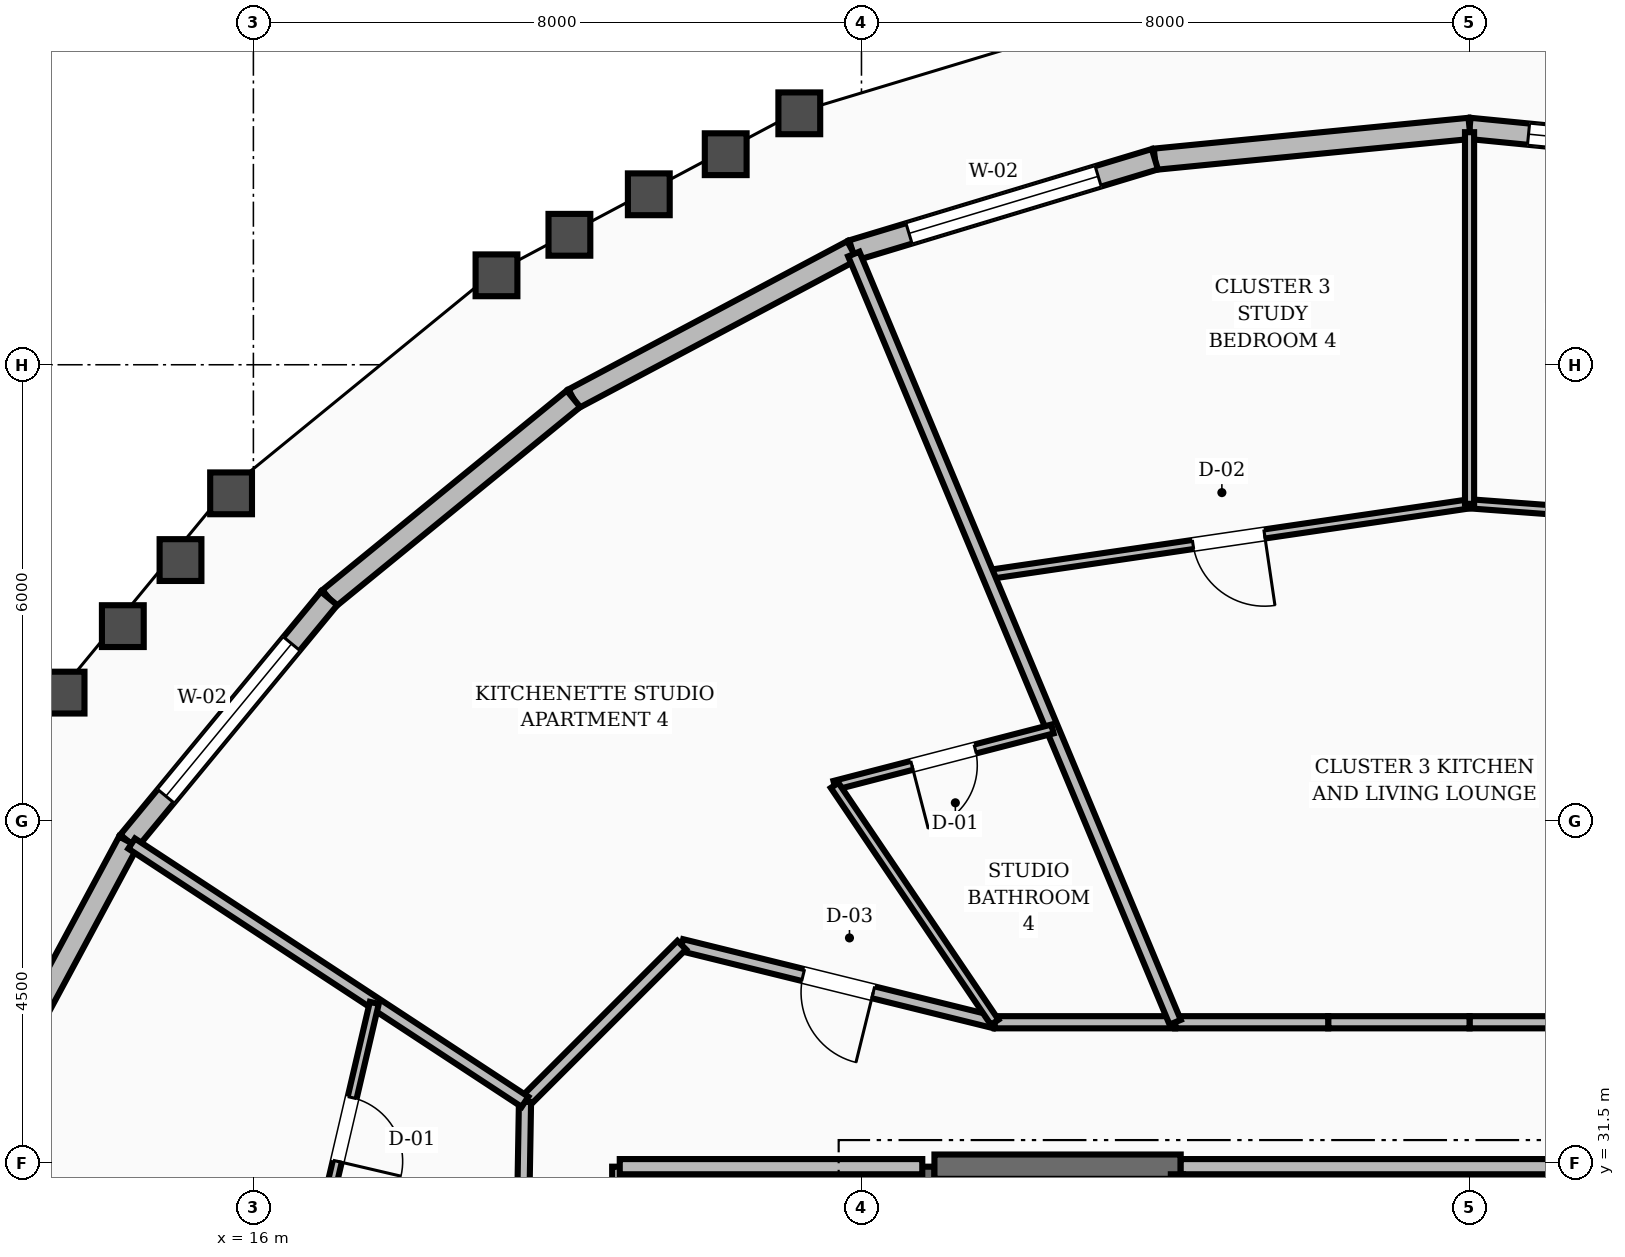
"""IFC4 building model, lengths in metres.
Left out: names, types, materials, properties, quantities, classifications, styles, units other than length and angle.
Written with IfcOpenShell. Run it as: python <this file> out.ifc"""

import sys

from ifc_helpers import new_model, si_unit, direction, frame, frame_2d, origin, place, context, subcontext, project, spatial, rectangle, extrude, element, fill, save


model = new_model("IFC4")
c1 = context("Model", 3, precision=1e-05, world=origin(), true_north=direction((0.0, 1.0)))
c2 = subcontext(c1, "Body", "Model", "MODEL_VIEW")
j1 = project(units=[si_unit("LENGTHUNIT", "METRE"), si_unit("PLANEANGLEUNIT", "RADIAN")], contexts=[c1])
p1 = place(None, origin())
s1 = spatial("IfcSite", under=j1, at=p1, CompositionType="ELEMENT")
p2 = place(p1, origin())
s2 = spatial("IfcBuilding", under=s1, at=p2, CompositionType="ELEMENT")
p3 = place(p2, frame((0.0, 0.0, 247.2)))
s3 = spatial("IfcBuildingStorey", under=s2, at=p3, CompositionType="ELEMENT", Elevation=247.2)
p4 = place(p3, frame((24.8, 25.15, 0.0), z_axis=(0.0, 0.0, 1.0), x_axis=(0.0, 1.0, 0.0)))
e1 = element("IfcWall", 1, at=p4, inside=s3, PredefinedType="SHEAR", context=c2, shape_type="SweptSolid", body=[
    extrude(rectangle(XDim=6.3, YDim=0.32, at=frame_2d((3.15, 0.0))), origin(), (0.0, 0.0, 1.0), 3.6),
])
p5 = place(p3, frame((24.96, 31.45, 0.0), z_axis=(0.0, 0.0, 1.0), x_axis=(1.0, 0.0, 0.0)))
e2 = element("IfcWall", 2, at=p5, inside=s3, PredefinedType="SHEAR", context=c2, shape_type="SweptSolid", body=[
    extrude(rectangle(XDim=3.24, YDim=0.32, at=frame_2d((1.62, 0.0))), origin(), (0.0, 0.0, 1.0), 3.6),
])
p6 = place(p3, frame((36.14, 44.704, 0.0), z_axis=(0.0, 0.0, 1.0), x_axis=(-0.995236791144, 0.09748707378, 0.0)))
e3 = element("IfcWall", 3, at=p6, inside=s3, PredefinedType="STANDARD", context=c2, shape_type="SweptSolid", body=[
    extrude(rectangle(XDim=4.16, YDim=0.28, at=frame_2d((2.08, 0.0))), origin(), (0.0, 0.0, 1.0), 2.88),
])
p7 = place(p6, frame((0.78, 0.0, 0.8)))
e4 = element("IfcOpeningElement", 4, at=p7, cuts=e3, PredefinedType="OPENING", context=c2, shape_type="SweptSolid", body=[
    extrude(rectangle(XDim=2.6, YDim=1.65, at=frame_2d((1.3, 0.825))), frame((0.0, 0.15, 0.0), z_axis=(0.0, -1.0, 0.0), x_axis=(1.0, 0.0, 0.0)), (0.0, 0.0, 1.0), 0.3),
])
p8 = place(p3, frame((32.0, 45.11, 0.0), z_axis=(0.0, 0.0, 1.0), x_axis=(-0.995236791144, -0.09748707378, 0.0)))
e5 = element("IfcWall", 5, at=p8, inside=s3, PredefinedType="STANDARD", context=c2, shape_type="SweptSolid", body=[
    extrude(rectangle(XDim=4.16, YDim=0.28, at=frame_2d((2.08, 0.0))), origin(), (0.0, 0.0, 1.0), 2.88),
])
p9 = place(p3, frame((27.86, 44.704, 0.0), z_axis=(0.0, 0.0, 1.0), x_axis=(-0.957348244256, -0.288936566083, 0.0)))
e6 = element("IfcWall", 6, at=p9, inside=s3, PredefinedType="STANDARD", context=c2, shape_type="SweptSolid", body=[
    extrude(rectangle(XDim=4.158, YDim=0.28, at=frame_2d((2.079, 0.0))), origin(), (0.0, 0.0, 1.0), 2.88),
])
p10 = place(p9, frame((0.779, 0.0, 0.8)))
e7 = element("IfcOpeningElement", 7, at=p10, cuts=e6, PredefinedType="OPENING", context=c2, shape_type="SweptSolid", body=[
    extrude(rectangle(XDim=2.6, YDim=1.65, at=frame_2d((1.3, 0.825))), frame((0.0, 0.15, 0.0), z_axis=(0.0, -1.0, 0.0), x_axis=(1.0, 0.0, 0.0)), (0.0, 0.0, 1.0), 0.3),
])
p11 = place(p3, frame((23.879, 43.503, 0.0), z_axis=(0.0, 0.0, 1.0), x_axis=(-0.88293458377, -0.469496028506, 0.0)))
e8 = element("IfcWall", 8, at=p11, inside=s3, PredefinedType="STANDARD", context=c2, shape_type="SweptSolid", body=[
    extrude(rectangle(XDim=4.155, YDim=0.28, at=frame_2d((2.077, 0.0))), origin(), (0.0, 0.0, 1.0), 2.88),
])
p12 = place(p3, frame((20.211, 41.552, 0.0), z_axis=(0.0, 0.0, 1.0), x_axis=(-0.774627683951, -0.632417545025, 0.0)))
e9 = element("IfcWall", 9, at=p12, inside=s3, PredefinedType="STANDARD", context=c2, shape_type="SweptSolid", body=[
    extrude(rectangle(XDim=4.151, YDim=0.28, at=frame_2d((2.076, 0.0))), origin(), (0.0, 0.0, 1.0), 2.88),
])
p13 = place(p3, frame((16.995, 38.927, 0.0), z_axis=(0.0, 0.0, 1.0), x_axis=(-0.63634880002, -0.771401454959, 0.0)))
e10 = element("IfcWall", 10, at=p13, inside=s3, PredefinedType="STANDARD", context=c2, shape_type="SweptSolid", body=[
    extrude(rectangle(XDim=4.147, YDim=0.28, at=frame_2d((2.073, 0.0))), origin(), (0.0, 0.0, 1.0), 2.88),
])
p14 = place(p13, frame((0.773, 0.0, 0.8)))
e11 = element("IfcOpeningElement", 11, at=p14, cuts=e10, PredefinedType="OPENING", context=c2, shape_type="SweptSolid", body=[
    extrude(rectangle(XDim=2.6, YDim=1.65, at=frame_2d((1.3, 0.825))), frame((0.0, 0.15, 0.0), z_axis=(0.0, -1.0, 0.0), x_axis=(1.0, 0.0, 0.0)), (0.0, 0.0, 1.0), 0.3),
])
p15 = place(p3, frame((14.356, 35.728, 0.0), z_axis=(0.0, 0.0, 1.0), x_axis=(-0.473326520675, -0.880887055658, 0.0)))
e12 = element("IfcWall", 12, at=p15, inside=s3, PredefinedType="STANDARD", context=c2, shape_type="SweptSolid", body=[
    extrude(rectangle(XDim=4.143, YDim=0.28, at=frame_2d((2.071, 0.0))), origin(), (0.0, 0.0, 1.0), 2.88),
])
p16 = place(p3, frame((20.82, 28.32, 0.0), z_axis=(0.0, 0.0, 1.0), x_axis=(0.0, 1.0, 0.0)))
e13 = element("IfcWall", 13, at=p16, inside=s3, PredefinedType="SOLIDWALL", context=c2, shape_type="SweptSolid", body=[
    extrude(rectangle(XDim=3.13, YDim=0.2, at=frame_2d((1.565, 0.0))), origin(), (0.0, 0.0, 1.0), 2.87),
])
p17 = place(p16, frame((1.09, 0.0, 0.0)))
e14 = element("IfcOpeningElement", 14, at=p17, cuts=e13, PredefinedType="OPENING", context=c2, shape_type="SweptSolid", body=[
    extrude(rectangle(XDim=0.95, YDim=2.1, at=frame_2d((0.475, 1.05))), frame((0.0, 0.11, 0.0), z_axis=(0.0, -1.0, 0.0), x_axis=(1.0, 0.0, 0.0)), (0.0, 0.0, 1.0), 0.22),
])
p18 = place(p3, frame((20.82, 31.45, 0.0), z_axis=(0.0, 0.0, 1.0), x_axis=(1.0, 0.0, 0.0)))
e15 = element("IfcWall", 15, at=p18, inside=s3, PredefinedType="SOLIDWALL", context=c2, shape_type="SweptSolid", body=[
    extrude(rectangle(XDim=3.98, YDim=0.2, at=frame_2d((1.99, 0.0))), origin(), (0.0, 0.0, 1.0), 2.87),
])
p19 = place(p3, frame((28.2, 31.45, 0.0), z_axis=(0.0, 0.0, 1.0), x_axis=(1.0, 0.0, 0.0)))
e16 = element("IfcWall", 16, at=p19, inside=s3, PredefinedType="SOLIDWALL", context=c2, shape_type="SweptSolid", body=[
    extrude(rectangle(XDim=7.6, YDim=0.2, at=frame_2d((3.8, 0.0))), origin(), (0.0, 0.0, 1.0), 2.87),
])
p20 = place(p3, frame((28.15, 25.25, 0.0), z_axis=(0.0, 0.0, 1.0), x_axis=(0.0, 1.0, 0.0)))
e17 = element("IfcWall", 17, at=p20, inside=s3, PredefinedType="SOLIDWALL", context=c2, shape_type="SweptSolid", body=[
    extrude(rectangle(XDim=6.1, YDim=0.16, at=frame_2d((3.05, 0.0))), origin(), (0.0, 0.0, 1.0), 2.87),
])
for number, where, z_axis, x_axis in (
    (18, (33.86, 33.35, 0.0), (0.0, 0.0, 1.0), (-1.0, 0.0, 0.0)),
    (19, (32.0, 33.35, 0.0), (0.0, 0.0, 1.0), (-1.0, 0.0, 0.0)),
):
    element("IfcWall", number, at=place(p3, frame(where, z_axis=z_axis, x_axis=x_axis)), inside=s3, PredefinedType="SOLIDWALL", context=c2, shape_type="SweptSolid", body=[
        extrude(rectangle(XDim=1.86, YDim=0.16, at=frame_2d((0.93, 0.0))), origin(), (0.0, 0.0, 1.0), 2.87),
    ])
p21 = place(p3, frame((30.14, 33.35, 0.0), z_axis=(0.0, 0.0, 1.0), x_axis=(-1.0, 0.0, 0.0)))
e20 = element("IfcWall", 20, at=p21, inside=s3, PredefinedType="SOLIDWALL", context=c2, shape_type="SweptSolid", body=[
    extrude(rectangle(XDim=2.013, YDim=0.16, at=frame_2d((1.006, 0.0))), origin(), (0.0, 0.0, 1.0), 2.87),
])
p22 = place(p3, frame((28.127, 33.35, 0.0), z_axis=(0.0, 0.0, 1.0), x_axis=(-1.0, 0.0, 0.0)))
e21 = element("IfcWall", 21, at=p22, inside=s3, PredefinedType="SOLIDWALL", context=c2, shape_type="SweptSolid", body=[
    extrude(rectangle(XDim=2.375, YDim=0.16, at=frame_2d((1.188, 0.0))), origin(), (0.0, 0.0, 1.0), 2.87),
])
p23 = place(p3, frame((25.752, 33.35, 0.0), z_axis=(0.0, 0.0, 1.0), x_axis=(-0.970939799552, 0.239323850978, 0.0)))
e22 = element("IfcWall", 22, at=p23, inside=s3, PredefinedType="SOLIDWALL", context=c2, shape_type="SweptSolid", body=[
    extrude(rectangle(XDim=4.241, YDim=0.16, at=frame_2d((2.12, 0.0))), origin(), (0.0, 0.0, 1.0), 2.87),
])
p24 = place(p23, frame((1.646, 0.0, 0.0)))
e23 = element("IfcOpeningElement", 23, at=p24, cuts=e22, PredefinedType="OPENING", context=c2, shape_type="SweptSolid", body=[
    extrude(rectangle(XDim=0.95, YDim=2.1, at=frame_2d((0.475, 1.05))), frame((0.0, 0.09, 0.0), z_axis=(0.0, -1.0, 0.0), x_axis=(1.0, 0.0, 0.0)), (0.0, 0.0, 1.0), 0.18),
])
p25 = place(p3, frame((21.635, 34.365, 0.0), z_axis=(0.0, 0.0, 1.0), x_axis=(-0.707106781187, -0.707106781187, 0.0)))
e24 = element("IfcWall", 24, at=p25, inside=s3, PredefinedType="SOLIDWALL", context=c2, shape_type="SweptSolid", body=[
    extrude(rectangle(XDim=2.916, YDim=0.16, at=frame_2d((1.458, 0.0))), origin(), (0.0, 0.0, 1.0), 2.87),
])
p26 = place(p3, frame((19.573, 32.303, 0.0), z_axis=(0.0, 0.0, 1.0), x_axis=(-0.016981035134, -0.999855811828, 0.0)))
e25 = element("IfcWall", 25, at=p26, inside=s3, PredefinedType="SOLIDWALL", context=c2, shape_type="SweptSolid", body=[
    extrude(rectangle(XDim=3.134, YDim=0.16, at=frame_2d((1.567, 0.0))), origin(), (0.0, 0.0, 1.0), 2.87),
])
p27 = place(p3, frame((35.182, 39.935, 0.0), z_axis=(0.0, 0.0, 1.0), x_axis=(-0.997276098801, 0.073758950379, 0.0)))
e26 = element("IfcWall", 26, at=p27, inside=s3, PredefinedType="PARTITIONING", context=c2, shape_type="SweptSolid", body=[
    extrude(rectangle(XDim=3.191, YDim=0.12, at=frame_2d((1.595, 0.0))), origin(), (0.0, 0.0, 1.0), 2.87),
])
p28 = place(p27, frame((1.12, 0.0, 0.0)))
e27 = element("IfcOpeningElement", 27, at=p28, cuts=e26, PredefinedType="OPENING", context=c2, shape_type="SweptSolid", body=[
    extrude(rectangle(XDim=0.95, YDim=2.1, at=frame_2d((0.475, 1.05))), frame((0.0, 0.07, 0.0), z_axis=(0.0, -1.0, 0.0), x_axis=(1.0, 0.0, 0.0)), (0.0, 0.0, 1.0), 0.14),
])
p29 = place(p3, frame((32.0, 40.171, 0.0), z_axis=(0.0, 0.0, 1.0), x_axis=(-0.989352356065, -0.145540082278, 0.0)))
e28 = element("IfcWall", 28, at=p29, inside=s3, PredefinedType="PARTITIONING", context=c2, shape_type="SweptSolid", body=[
    extrude(rectangle(XDim=6.405, YDim=0.12, at=frame_2d((3.202, 0.0))), origin(), (0.0, 0.0, 1.0), 2.87),
])
p30 = place(p29, frame((2.727, 0.0, 0.0)))
e29 = element("IfcOpeningElement", 29, at=p30, cuts=e28, PredefinedType="OPENING", context=c2, shape_type="SweptSolid", body=[
    extrude(rectangle(XDim=0.95, YDim=2.1, at=frame_2d((0.475, 1.05))), frame((0.0, 0.07, 0.0), z_axis=(0.0, -1.0, 0.0), x_axis=(1.0, 0.0, 0.0)), (0.0, 0.0, 1.0), 0.14),
])
p31 = place(p3, frame((32.0, 40.171, 0.0), z_axis=(0.0, 0.0, 1.0), x_axis=(0.0, 1.0, 0.0)))
e30 = element("IfcWall", 30, at=p31, inside=s3, PredefinedType="PARTITIONING", context=c2, shape_type="SweptSolid", body=[
    extrude(rectangle(XDim=4.889, YDim=0.12, at=frame_2d((2.445, 0.0))), origin(), (0.0, 0.0, 1.0), 2.87),
])
p32 = place(p3, frame((28.127, 33.35, 0.0), z_axis=(0.0, 0.0, 1.0), x_axis=(-0.385967865978, 0.922512225628, 0.0)))
e31 = element("IfcWall", 31, at=p32, inside=s3, PredefinedType="SOLIDWALL", context=c2, shape_type="SweptSolid", body=[
    extrude(rectangle(XDim=10.956, YDim=0.16, at=frame_2d((5.478, 0.0))), origin(), (0.0, 0.0, 1.0), 2.87),
])
p33 = place(p3, frame((26.513, 37.208, 0.0), z_axis=(0.0, 0.0, 1.0), x_axis=(-0.968151047418, -0.250366829639, 0.0)))
e32 = element("IfcWall", 32, at=p33, inside=s3, PredefinedType="PARTITIONING", context=c2, shape_type="SweptSolid", body=[
    extrude(rectangle(XDim=2.96, YDim=0.12, at=frame_2d((1.48, 0.0))), origin(), (0.0, 0.0, 1.0), 2.87),
])
p34 = place(p33, frame((1.05, 0.0, 0.0)))
e33 = element("IfcOpeningElement", 33, at=p34, cuts=e32, PredefinedType="OPENING", context=c2, shape_type="SweptSolid", body=[
    extrude(rectangle(XDim=0.86, YDim=2.1, at=frame_2d((0.43, 1.05))), frame((0.0, 0.07, 0.0), z_axis=(0.0, -1.0, 0.0), x_axis=(1.0, 0.0, 0.0)), (0.0, 0.0, 1.0), 0.14),
])
p35 = place(p3, frame((25.752, 33.35, 0.0), z_axis=(0.0, 0.0, 1.0), x_axis=(-0.559827300853, 0.828609312776, 0.0)))
e34 = element("IfcWall", 34, at=p35, inside=s3, PredefinedType="PARTITIONING", context=c2, shape_type="SweptSolid", body=[
    extrude(rectangle(XDim=3.761, YDim=0.12, at=frame_2d((1.881, 0.0))), origin(), (0.0, 0.0, 1.0), 2.87),
])
p36 = place(p3, frame((19.573, 32.303, 0.0), z_axis=(0.0, 0.0, 1.0), x_axis=(-0.835967060614, 0.548779622043, 0.0)))
e35 = element("IfcWall", 35, at=p36, inside=s3, PredefinedType="SOLIDWALL", context=c2, shape_type="SweptSolid", body=[
    extrude(rectangle(XDim=6.19, YDim=0.16, at=frame_2d((3.095, 0.0))), origin(), (0.0, 0.0, 1.0), 2.87),
])
p37 = place(p3, frame((17.591, 33.604, 0.0), z_axis=(0.0, 0.0, 1.0), x_axis=(-0.22755463123, -0.973765315569, 0.0)))
e36 = element("IfcWall", 36, at=p37, inside=s3, PredefinedType="PARTITIONING", context=c2, shape_type="SweptSolid", body=[
    extrude(rectangle(XDim=3.419, YDim=0.12, at=frame_2d((1.709, 0.0))), origin(), (0.0, 0.0, 1.0), 2.87),
])
p38 = place(p37, frame((1.28, 0.0, 0.0)))
e37 = element("IfcOpeningElement", 37, at=p38, cuts=e36, PredefinedType="OPENING", context=c2, shape_type="SweptSolid", body=[
    extrude(rectangle(XDim=0.86, YDim=2.1, at=frame_2d((0.43, 1.05))), frame((0.0, 0.07, 0.0), z_axis=(0.0, -1.0, 0.0), x_axis=(1.0, 0.0, 0.0)), (0.0, 0.0, 1.0), 0.14),
])
p39 = place(p7, origin())
e38 = element("IfcWindow", 38, at=p39, inside=s3, PartitioningType="SINGLE_PANEL", PredefinedType="WINDOW", context=c2, shape_type="SweptSolid", body=[
    extrude(rectangle(XDim=2.6, YDim=1.65, at=frame_2d((1.3, 0.825))), frame((0.0, 0.03, 0.0), z_axis=(0.0, -1.0, 0.0), x_axis=(1.0, 0.0, 0.0)), (0.0, 0.0, 1.0), 0.06),
])
fill(e4, e38)
p40 = place(p10, origin())
e39 = element("IfcWindow", 39, at=p40, inside=s3, PartitioningType="SINGLE_PANEL", PredefinedType="WINDOW", context=c2, shape_type="SweptSolid", body=[
    extrude(rectangle(XDim=2.6, YDim=1.65, at=frame_2d((1.3, 0.825))), frame((0.0, 0.03, 0.0), z_axis=(0.0, -1.0, 0.0), x_axis=(1.0, 0.0, 0.0)), (0.0, 0.0, 1.0), 0.06),
])
fill(e7, e39)
p41 = place(p14, origin())
e40 = element("IfcWindow", 40, at=p41, inside=s3, PartitioningType="SINGLE_PANEL", PredefinedType="WINDOW", context=c2, shape_type="SweptSolid", body=[
    extrude(rectangle(XDim=2.6, YDim=1.65, at=frame_2d((1.3, 0.825))), frame((0.0, 0.03, 0.0), z_axis=(0.0, -1.0, 0.0), x_axis=(1.0, 0.0, 0.0)), (0.0, 0.0, 1.0), 0.06),
])
fill(e11, e40)
p42 = place(p30, origin())
e41 = element("IfcDoor", 41, at=p42, inside=s3, OperationType="SINGLE_SWING_LEFT", PredefinedType="DOOR", context=c2, shape_type="SweptSolid", body=[
    extrude(rectangle(XDim=0.95, YDim=2.1, at=frame_2d((0.475, 1.05))), frame((0.0, 0.025, 0.0), z_axis=(0.0, -1.0, 0.0), x_axis=(1.0, 0.0, 0.0)), (0.0, 0.0, 1.0), 0.05),
])
fill(e29, e41)
p43 = place(p34, origin())
e42 = element("IfcDoor", 42, at=p43, inside=s3, OperationType="SINGLE_SWING_RIGHT", PredefinedType="DOOR", context=c2, shape_type="SweptSolid", body=[
    extrude(rectangle(XDim=0.86, YDim=2.1, at=frame_2d((0.43, 1.05))), frame((0.0, 0.025, 0.0), z_axis=(0.0, -1.0, 0.0), x_axis=(1.0, 0.0, 0.0)), (0.0, 0.0, 1.0), 0.05),
])
fill(e33, e42)
p44 = place(p24, origin())
e43 = element("IfcDoor", 43, at=p44, inside=s3, OperationType="SINGLE_SWING_LEFT", PredefinedType="DOOR", context=c2, shape_type="SweptSolid", body=[
    extrude(rectangle(XDim=0.95, YDim=2.1, at=frame_2d((0.475, 1.05))), frame((0.0, 0.025, 0.0), z_axis=(0.0, -1.0, 0.0), x_axis=(1.0, 0.0, 0.0)), (0.0, 0.0, 1.0), 0.05),
])
fill(e23, e43)
p45 = place(p38, origin())
e44 = element("IfcDoor", 44, at=p45, inside=s3, OperationType="SINGLE_SWING_RIGHT", PredefinedType="DOOR", context=c2, shape_type="SweptSolid", body=[
    extrude(rectangle(XDim=0.86, YDim=2.1, at=frame_2d((0.43, 1.05))), frame((0.0, 0.025, 0.0), z_axis=(0.0, -1.0, 0.0), x_axis=(1.0, 0.0, 0.0)), (0.0, 0.0, 1.0), 0.05),
])
fill(e37, e44)
save(model, sys.argv[1])
